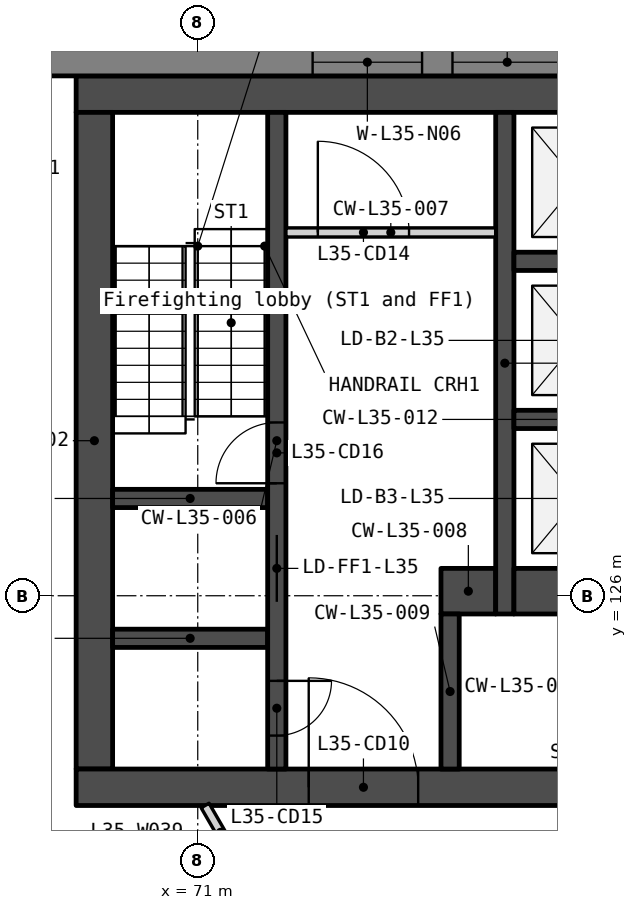
"""IFC4 building model, lengths in metres.
Left out: names, types, materials, properties, quantities, classifications, styles, units other than length and angle.
Written with IfcOpenShell. Run it as: python <this file> out.ifc"""

import sys

from ifc_helpers import new_model, si_unit, direction, frame, frame_2d, origin, place, context, subcontext, project, spatial, polyline, rectangle, outline, extrude, element, fill, save


model = new_model("IFC4")
c1 = context("Model", 3, precision=1e-05, world=origin(), true_north=direction((0.0, 1.0)))
c2 = subcontext(c1, "Body", "Model", "MODEL_VIEW")
j1 = project(units=[si_unit("LENGTHUNIT", "METRE"), si_unit("PLANEANGLEUNIT", "RADIAN")], contexts=[c1])
p1 = place(None, origin())
s1 = spatial("IfcSite", under=j1, at=p1, CompositionType="ELEMENT")
p2 = place(p1, origin())
s2 = spatial("IfcBuilding", under=s1, at=p2, CompositionType="ELEMENT")
p3 = place(p2, frame((0.0, 0.0, 140.3)))
s3 = spatial("IfcBuildingStorey", under=s2, at=p3, CompositionType="ELEMENT", Elevation=140.3)
p4 = place(p3, frame((69.0, 134.25, 0.0), z_axis=(0.0, 0.0, 1.0), x_axis=(1.0, 0.0, 0.0)))
e1 = element("IfcWall", 1, at=p4, inside=s3, PredefinedType="SOLIDWALL", context=c2, shape_type="SweptSolid", body=[
    extrude(rectangle(XDim=22.0, YDim=0.6, at=frame_2d((11.0, 0.0))), origin(), (0.0, 0.0, 1.0), 3.75),
])
p5 = place(p3, frame((69.3, 133.95, 0.0), z_axis=(0.0, 0.0, 1.0), x_axis=(0.0, -1.0, 0.0)))
e2 = element("IfcWall", 2, at=p5, inside=s3, PredefinedType="SOLIDWALL", context=c2, shape_type="SweptSolid", body=[
    extrude(rectangle(XDim=10.8, YDim=0.6, at=frame_2d((5.4, 0.0))), origin(), (0.0, 0.0, 1.0), 3.75),
])
p6 = place(p3, frame((69.0, 122.85, 0.0), z_axis=(0.0, 0.0, 1.0), x_axis=(1.0, 0.0, 0.0)))
e3 = element("IfcWall", 3, at=p6, inside=s3, PredefinedType="SOLIDWALL", context=c2, shape_type="SweptSolid", body=[
    extrude(rectangle(XDim=22.0, YDim=0.6, at=frame_2d((11.0, 0.0))), origin(), (0.0, 0.0, 1.0), 3.75),
])
p7 = place(p6, frame((16.375, 0.0, 0.0)))
e4 = element("IfcOpeningElement", 4, at=p7, cuts=e3, PredefinedType="OPENING", context=c2, shape_type="SweptSolid", body=[
    extrude(rectangle(XDim=1.8, YDim=2.1, at=frame_2d((0.9, 1.05))), frame((0.0, 0.31, 0.0), z_axis=(0.0, -1.0, 0.0), x_axis=(1.0, 0.0, 0.0)), (0.0, 0.0, 1.0), 0.62),
])
p8 = place(p6, frame((3.825, 0.0, 0.0)))
e5 = element("IfcOpeningElement", 5, at=p8, cuts=e3, PredefinedType="OPENING", context=c2, shape_type="SweptSolid", body=[
    extrude(rectangle(XDim=1.8, YDim=2.1, at=frame_2d((0.9, 1.05))), frame((0.0, 0.31, 0.0), z_axis=(0.0, -1.0, 0.0), x_axis=(1.0, 0.0, 0.0)), (0.0, 0.0, 1.0), 0.62),
])
p9 = place(p6, frame((12.85, 0.0, 0.0)))
e6 = element("IfcOpeningElement", 6, at=p9, cuts=e3, PredefinedType="OPENING", context=c2, shape_type="SweptSolid", body=[
    extrude(rectangle(XDim=1.5, YDim=2.1, at=frame_2d((0.75, 1.05))), frame((0.0, 0.31, 0.0), z_axis=(0.0, -1.0, 0.0), x_axis=(1.0, 0.0, 0.0)), (0.0, 0.0, 1.0), 0.62),
])
for number, where, z_axis, x_axis in (
    (7, (69.6, 127.6, 0.0), (0.0, 0.0, 1.0), (1.0, 0.0, 0.0)),
    (8, (69.6, 125.3, 0.0), (0.0, 0.0, 1.0), (1.0, 0.0, 0.0)),
):
    element("IfcWall", number, at=place(p3, frame(where, z_axis=z_axis, x_axis=x_axis)), inside=s3, PredefinedType="SOLIDWALL", context=c2, shape_type="SweptSolid", body=[
        extrude(rectangle(XDim=2.55, YDim=0.3, at=frame_2d((1.275, 0.0))), origin(), (0.0, 0.0, 1.0), 3.75),
    ])
p10 = place(p3, frame((72.3, 133.95, 0.0), z_axis=(0.0, 0.0, 1.0), x_axis=(0.0, -1.0, 0.0)))
e9 = element("IfcWall", 9, at=p10, inside=s3, PredefinedType="SOLIDWALL", context=c2, shape_type="SweptSolid", body=[
    extrude(rectangle(XDim=10.8, YDim=0.3, at=frame_2d((5.4, 0.0))), origin(), (0.0, 0.0, 1.0), 3.75),
])
p11 = place(p10, frame((6.95, 0.0, 0.0)))
e10 = element("IfcOpeningElement", 10, at=p11, cuts=e9, PredefinedType="OPENING", context=c2, shape_type="SweptSolid", body=[
    extrude(rectangle(XDim=1.1, YDim=2.1, at=frame_2d((0.55, 1.05))), frame((0.0, 0.16, 0.0), z_axis=(0.0, -1.0, 0.0), x_axis=(1.0, 0.0, 0.0)), (0.0, 0.0, 1.0), 0.32),
])
p12 = place(p10, frame((9.35, 0.0, 0.0)))
e11 = element("IfcOpeningElement", 11, at=p12, cuts=e9, PredefinedType="OPENING", context=c2, shape_type="SweptSolid", body=[
    extrude(rectangle(XDim=0.9, YDim=2.1, at=frame_2d((0.45, 1.05))), frame((0.0, 0.16, 0.0), z_axis=(0.0, -1.0, 0.0), x_axis=(1.0, 0.0, 0.0)), (0.0, 0.0, 1.0), 0.32),
])
p13 = place(p10, frame((5.1, 0.0, 0.0)))
e12 = element("IfcOpeningElement", 12, at=p13, cuts=e9, PredefinedType="OPENING", context=c2, shape_type="SweptSolid", body=[
    extrude(rectangle(XDim=1.0, YDim=2.1, at=frame_2d((0.5, 1.05))), frame((0.0, 0.16, 0.0), z_axis=(0.0, -1.0, 0.0), x_axis=(1.0, 0.0, 0.0)), (0.0, 0.0, 1.0), 0.32),
])
p14 = place(p3, frame((72.45, 131.975, 0.0), z_axis=(0.0, 0.0, 1.0), x_axis=(1.0, 0.0, 0.0)))
e13 = element("IfcWall", 13, at=p14, inside=s3, PredefinedType="PARTITIONING", context=c2, shape_type="SweptSolid", body=[
    extrude(rectangle(XDim=3.45, YDim=0.15, at=frame_2d((1.725, 0.0))), origin(), (0.0, 0.0, 1.0), 3.75),
])
p15 = place(p14, frame((0.525, 0.0, 0.0)))
e14 = element("IfcOpeningElement", 14, at=p15, cuts=e13, PredefinedType="OPENING", context=c2, shape_type="SweptSolid", body=[
    extrude(rectangle(XDim=1.5, YDim=2.1, at=frame_2d((0.75, 1.05))), frame((0.0, 0.085, 0.0), z_axis=(0.0, -1.0, 0.0), x_axis=(1.0, 0.0, 0.0)), (0.0, 0.0, 1.0), 0.17),
])
p16 = place(p3, frame((75.0, 126.075, 0.0), z_axis=(0.0, 0.0, 1.0), x_axis=(1.0, 0.0, 0.0)))
e15 = element("IfcWall", 15, at=p16, inside=s3, PredefinedType="SOLIDWALL", context=c2, shape_type="SweptSolid", body=[
    extrude(rectangle(XDim=0.9, YDim=0.75, at=frame_2d((0.45, 0.0))), origin(), (0.0, 0.0, 1.0), 3.75),
])
p17 = place(p3, frame((75.15, 125.7, 0.0), z_axis=(0.0, 0.0, 1.0), x_axis=(0.0, -1.0, 0.0)))
e16 = element("IfcWall", 16, at=p17, inside=s3, PredefinedType="SOLIDWALL", context=c2, shape_type="SweptSolid", body=[
    extrude(rectangle(XDim=2.55, YDim=0.3, at=frame_2d((1.275, 0.0))), origin(), (0.0, 0.0, 1.0), 3.75),
])
p18 = place(p3, frame((76.05, 133.95, 0.0), z_axis=(0.0, 0.0, 1.0), x_axis=(0.0, -1.0, 0.0)))
e17 = element("IfcWall", 17, at=p18, inside=s3, PredefinedType="SOLIDWALL", context=c2, shape_type="SweptSolid", body=[
    extrude(rectangle(XDim=8.25, YDim=0.3, at=frame_2d((4.125, 0.0))), origin(), (0.0, 0.0, 1.0), 3.75),
])
for number, where, z_axis, x_axis in (
    (18, (76.2, 131.5, 0.0), (0.0, 0.0, 1.0), (1.0, 0.0, 0.0)),
    (19, (76.2, 128.9, 0.0), (0.0, 0.0, 1.0), (1.0, 0.0, 0.0)),
):
    element("IfcWall", number, at=place(p3, frame(where, z_axis=z_axis, x_axis=x_axis)), inside=s3, PredefinedType="SOLIDWALL", context=c2, shape_type="SweptSolid", body=[
        extrude(rectangle(XDim=2.1, YDim=0.3, at=frame_2d((1.05, 0.0))), origin(), (0.0, 0.0, 1.0), 3.75),
    ])
p19 = place(p3, frame((76.2, 126.075, 0.0), z_axis=(0.0, 0.0, 1.0), x_axis=(1.0, 0.0, 0.0)))
e20 = element("IfcWall", 20, at=p19, inside=s3, PredefinedType="SOLIDWALL", context=c2, shape_type="SweptSolid", body=[
    extrude(rectangle(XDim=2.1, YDim=0.75, at=frame_2d((1.05, 0.0))), origin(), (0.0, 0.0, 1.0), 3.75),
])
p20 = place(p3, frame((100.243, 134.775, -0.15), z_axis=(0.0, 0.0, 1.0), x_axis=(-1.0, 0.0, 0.0)))
e21 = element("IfcWall", 21, at=p20, inside=s3, PredefinedType="SOLIDWALL", context=c2, shape_type="SweptSolid", body=[
    extrude(outline(polyline([(0.0, 0.0), (0.0, 3.9), (33.425, 3.9), (33.425, 0.0), (0.0, 0.0)])), frame((0.0, 0.225, 0.0), z_axis=(0.0, -1.0, 0.0), x_axis=(1.0, 0.0, 0.0)), (0.0, 0.0, 1.0), 0.45),
])
p21 = place(p20, frame((3.011, 0.0, 0.95)))
e22 = element("IfcOpeningElement", 22, at=p21, cuts=e21, PredefinedType="OPENING", context=c2, shape_type="SweptSolid", body=[
    extrude(rectangle(XDim=1.8, YDim=2.2, at=frame_2d((0.9, 1.1))), frame((0.0, 0.235, 0.0), z_axis=(0.0, -1.0, 0.0), x_axis=(1.0, 0.0, 0.0)), (0.0, 0.0, 1.0), 0.47),
])
p22 = place(p20, frame((5.311, 0.0, 0.95)))
e23 = element("IfcOpeningElement", 23, at=p22, cuts=e21, PredefinedType="OPENING", context=c2, shape_type="SweptSolid", body=[
    extrude(rectangle(XDim=1.8, YDim=2.2, at=frame_2d((0.9, 1.1))), frame((0.0, 0.235, 0.0), z_axis=(0.0, -1.0, 0.0), x_axis=(1.0, 0.0, 0.0)), (0.0, 0.0, 1.0), 0.47),
])
p23 = place(p20, frame((13.132, 0.0, 0.95)))
e24 = element("IfcOpeningElement", 24, at=p23, cuts=e21, PredefinedType="OPENING", context=c2, shape_type="SweptSolid", body=[
    extrude(rectangle(XDim=1.8, YDim=2.2, at=frame_2d((0.9, 1.1))), frame((0.0, 0.235, 0.0), z_axis=(0.0, -1.0, 0.0), x_axis=(1.0, 0.0, 0.0)), (0.0, 0.0, 1.0), 0.47),
])
p24 = place(p20, frame((15.432, 0.0, 0.95)))
e25 = element("IfcOpeningElement", 25, at=p24, cuts=e21, PredefinedType="OPENING", context=c2, shape_type="SweptSolid", body=[
    extrude(rectangle(XDim=1.8, YDim=2.2, at=frame_2d((0.9, 1.1))), frame((0.0, 0.235, 0.0), z_axis=(0.0, -1.0, 0.0), x_axis=(1.0, 0.0, 0.0)), (0.0, 0.0, 1.0), 0.47),
])
p25 = place(p20, frame((23.254, 0.0, 0.95)))
e26 = element("IfcOpeningElement", 26, at=p25, cuts=e21, PredefinedType="OPENING", context=c2, shape_type="SweptSolid", body=[
    extrude(rectangle(XDim=1.8, YDim=2.2, at=frame_2d((0.9, 1.1))), frame((0.0, 0.235, 0.0), z_axis=(0.0, -1.0, 0.0), x_axis=(1.0, 0.0, 0.0)), (0.0, 0.0, 1.0), 0.47),
])
p26 = place(p20, frame((25.554, 0.0, 0.95)))
e27 = element("IfcOpeningElement", 27, at=p26, cuts=e21, PredefinedType="OPENING", context=c2, shape_type="SweptSolid", body=[
    extrude(rectangle(XDim=1.8, YDim=2.2, at=frame_2d((0.9, 1.1))), frame((0.0, 0.235, 0.0), z_axis=(0.0, -1.0, 0.0), x_axis=(1.0, 0.0, 0.0)), (0.0, 0.0, 1.0), 0.47),
])
p27 = place(p3, frame((57.652, 131.129, -0.15), z_axis=(0.0, 0.0, 1.0), x_axis=(0.499997369791, -0.866026922331, 0.0)))
e28 = element("IfcWall", 28, at=p27, inside=s3, PredefinedType="SOLIDWALL", context=c2, shape_type="SweptSolid", body=[
    extrude(outline(polyline([(40.486, 0.0), (40.486, 3.9), (0.0, 3.9), (0.0, 0.0), (40.486, 0.0)])), frame((0.0, 0.225, 0.0), z_axis=(0.0, -1.0, 0.0), x_axis=(1.0, 0.0, 0.0)), (0.0, 0.0, 1.0), 0.45),
])
p28 = place(p27, frame((3.011, 0.0, 0.95)))
e29 = element("IfcOpeningElement", 29, at=p28, cuts=e28, PredefinedType="OPENING", context=c2, shape_type="SweptSolid", body=[
    extrude(rectangle(XDim=1.8, YDim=2.2, at=frame_2d((0.9, 1.1))), frame((0.0, 0.235, 0.0), z_axis=(0.0, -1.0, 0.0), x_axis=(1.0, 0.0, 0.0)), (0.0, 0.0, 1.0), 0.47),
])
p29 = place(p27, frame((5.311, 0.0, 0.95)))
e30 = element("IfcOpeningElement", 30, at=p29, cuts=e28, PredefinedType="OPENING", context=c2, shape_type="SweptSolid", body=[
    extrude(rectangle(XDim=1.8, YDim=2.2, at=frame_2d((0.9, 1.1))), frame((0.0, 0.235, 0.0), z_axis=(0.0, -1.0, 0.0), x_axis=(1.0, 0.0, 0.0)), (0.0, 0.0, 1.0), 0.47),
])
p30 = place(p27, frame((13.132, 0.0, 0.95)))
e31 = element("IfcOpeningElement", 31, at=p30, cuts=e28, PredefinedType="OPENING", context=c2, shape_type="SweptSolid", body=[
    extrude(rectangle(XDim=1.8, YDim=2.2, at=frame_2d((0.9, 1.1))), frame((0.0, 0.235, 0.0), z_axis=(0.0, -1.0, 0.0), x_axis=(1.0, 0.0, 0.0)), (0.0, 0.0, 1.0), 0.47),
])
p31 = place(p27, frame((15.432, 0.0, 0.95)))
e32 = element("IfcOpeningElement", 32, at=p31, cuts=e28, PredefinedType="OPENING", context=c2, shape_type="SweptSolid", body=[
    extrude(rectangle(XDim=1.8, YDim=2.2, at=frame_2d((0.9, 1.1))), frame((0.0, 0.235, 0.0), z_axis=(0.0, -1.0, 0.0), x_axis=(1.0, 0.0, 0.0)), (0.0, 0.0, 1.0), 0.47),
])
p32 = place(p27, frame((23.254, 0.0, 0.95)))
e33 = element("IfcOpeningElement", 33, at=p32, cuts=e28, PredefinedType="OPENING", context=c2, shape_type="SweptSolid", body=[
    extrude(rectangle(XDim=1.8, YDim=2.2, at=frame_2d((0.9, 1.1))), frame((0.0, 0.235, 0.0), z_axis=(0.0, -1.0, 0.0), x_axis=(1.0, 0.0, 0.0)), (0.0, 0.0, 1.0), 0.47),
])
p33 = place(p27, frame((25.554, 0.0, 0.95)))
e34 = element("IfcOpeningElement", 34, at=p33, cuts=e28, PredefinedType="OPENING", context=c2, shape_type="SweptSolid", body=[
    extrude(rectangle(XDim=1.8, YDim=2.2, at=frame_2d((0.9, 1.1))), frame((0.0, 0.235, 0.0), z_axis=(0.0, -1.0, 0.0), x_axis=(1.0, 0.0, 0.0)), (0.0, 0.0, 1.0), 0.47),
])
p34 = place(p27, frame((33.375, 0.0, 0.95)))
e35 = element("IfcOpeningElement", 35, at=p34, cuts=e28, PredefinedType="OPENING", context=c2, shape_type="SweptSolid", body=[
    extrude(rectangle(XDim=1.8, YDim=2.2, at=frame_2d((0.9, 1.1))), frame((0.0, 0.235, 0.0), z_axis=(0.0, -1.0, 0.0), x_axis=(1.0, 0.0, 0.0)), (0.0, 0.0, 1.0), 0.47),
])
p35 = place(p27, frame((35.675, 0.0, 0.95)))
e36 = element("IfcOpeningElement", 36, at=p35, cuts=e28, PredefinedType="OPENING", context=c2, shape_type="SweptSolid", body=[
    extrude(rectangle(XDim=1.8, YDim=2.2, at=frame_2d((0.9, 1.1))), frame((0.0, 0.235, 0.0), z_axis=(0.0, -1.0, 0.0), x_axis=(1.0, 0.0, 0.0)), (0.0, 0.0, 1.0), 0.47),
])
p36 = place(p3, frame((71.121, 122.55, 0.0), z_axis=(0.0, 0.0, 1.0), x_axis=(0.500006018292, -0.866021929094, 0.0)))
e37 = element("IfcWall", 37, at=p36, inside=s3, PredefinedType="PARTITIONING", context=c2, shape_type="SweptSolid", body=[
    extrude(rectangle(XDim=1.019, YDim=0.15, at=frame_2d((0.509, 0.0))), origin(), (0.0, 0.0, 1.0), 3.75),
])
p37 = place(p11, origin())
e38 = element("IfcDoor", 38, at=p37, inside=s3, OperationType="SLIDING_TO_LEFT", PredefinedType="DOOR", context=c2, shape_type="SweptSolid", body=[
    extrude(rectangle(XDim=1.1, YDim=2.1, at=frame_2d((0.55, 1.05))), frame((0.0, 0.025, 0.0), z_axis=(0.0, -1.0, 0.0), x_axis=(1.0, 0.0, 0.0)), (0.0, 0.0, 1.0), 0.05),
])
fill(e10, e38)
p38 = place(p8, origin())
e39 = element("IfcDoor", 39, at=p38, inside=s3, OperationType="DOUBLE_DOOR_DOUBLE_SWING", PredefinedType="DOOR", context=c2, shape_type="SweptSolid", body=[
    extrude(rectangle(XDim=1.8, YDim=2.1, at=frame_2d((0.9, 1.05))), frame((0.0, 0.025, 0.0), z_axis=(0.0, -1.0, 0.0), x_axis=(1.0, 0.0, 0.0)), (0.0, 0.0, 1.0), 0.05),
])
fill(e5, e39)
p39 = place(p15, origin())
e40 = element("IfcDoor", 40, at=p39, inside=s3, OperationType="DOUBLE_DOOR_DOUBLE_SWING", PredefinedType="DOOR", context=c2, shape_type="SweptSolid", body=[
    extrude(rectangle(XDim=1.5, YDim=2.1, at=frame_2d((0.75, 1.05))), frame((0.0, 0.025, 0.0), z_axis=(0.0, -1.0, 0.0), x_axis=(1.0, 0.0, 0.0)), (0.0, 0.0, 1.0), 0.05),
])
fill(e14, e40)
p40 = place(p12, origin())
e41 = element("IfcDoor", 41, at=p40, inside=s3, OperationType="SINGLE_SWING_LEFT", PredefinedType="DOOR", context=c2, shape_type="SweptSolid", body=[
    extrude(rectangle(XDim=0.9, YDim=2.1, at=frame_2d((0.45, 1.05))), frame((0.0, 0.025, 0.0), z_axis=(0.0, -1.0, 0.0), x_axis=(1.0, 0.0, 0.0)), (0.0, 0.0, 1.0), 0.05),
])
fill(e11, e41)
p41 = place(p13, origin())
e42 = element("IfcDoor", 42, at=p41, inside=s3, OperationType="SINGLE_SWING_RIGHT", PredefinedType="DOOR", context=c2, shape_type="SweptSolid", body=[
    extrude(rectangle(XDim=1.0, YDim=2.1, at=frame_2d((0.5, 1.05))), frame((0.0, 0.025, 0.0), z_axis=(0.0, -1.0, 0.0), x_axis=(1.0, 0.0, 0.0)), (0.0, 0.0, 1.0), 0.05),
])
fill(e12, e42)
p42 = place(p25, origin())
e43 = element("IfcWindow", 43, at=p42, inside=s3, PartitioningType="SINGLE_PANEL", PredefinedType="WINDOW", context=c2, shape_type="SweptSolid", body=[
    extrude(rectangle(XDim=1.8, YDim=2.2, at=frame_2d((0.9, 1.1))), frame((0.0, 0.03, 0.0), z_axis=(0.0, -1.0, 0.0), x_axis=(1.0, 0.0, 0.0)), (0.0, 0.0, 1.0), 0.06),
])
fill(e26, e43)
p43 = place(p26, origin())
e44 = element("IfcWindow", 44, at=p43, inside=s3, PartitioningType="SINGLE_PANEL", PredefinedType="WINDOW", context=c2, shape_type="SweptSolid", body=[
    extrude(rectangle(XDim=1.8, YDim=2.2, at=frame_2d((0.9, 1.1))), frame((0.0, 0.03, 0.0), z_axis=(0.0, -1.0, 0.0), x_axis=(1.0, 0.0, 0.0)), (0.0, 0.0, 1.0), 0.06),
])
fill(e27, e44)
save(model, sys.argv[1])
